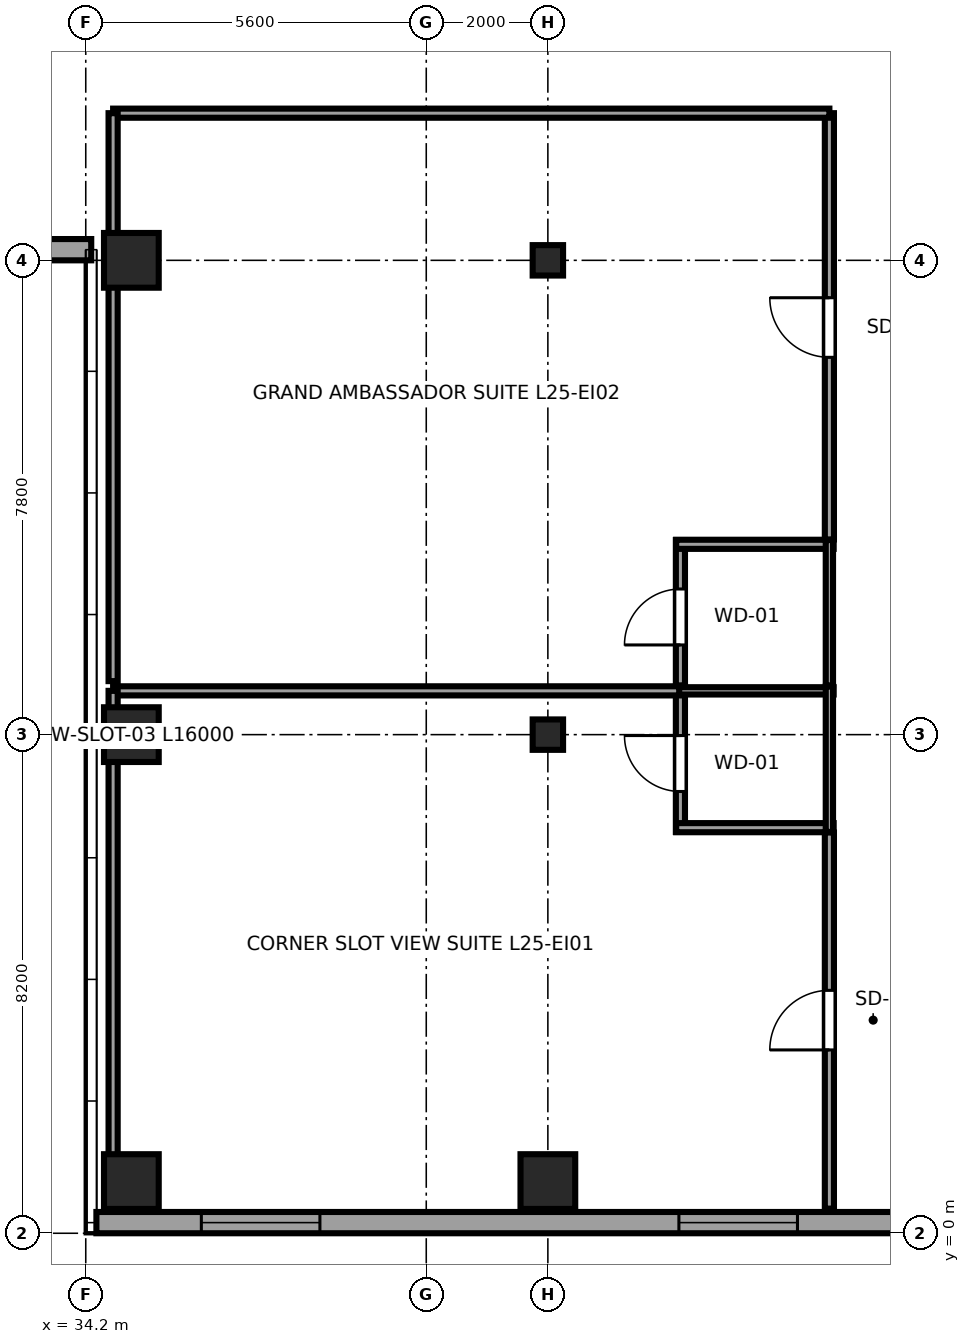
"""IFC4 building model, lengths in metres.
Left out: names, types, materials, properties, quantities, classifications, styles, units other than length and angle.
Written with IfcOpenShell. Run it as: python <this file> out.ifc"""

import sys

from ifc_helpers import new_model, si_unit, direction, frame, frame_2d, origin, origin_2d, place, context, subcontext, project, spatial, rectangle, i_section, extrude, source, transform, mapped, element, fill, save


model = new_model("IFC4")
c1 = context("Model", 3, precision=1e-05, world=origin(), true_north=direction((0.0, 1.0)))
c2 = subcontext(c1, "Body", "Model", "MODEL_VIEW")
j1 = project(units=[si_unit("LENGTHUNIT", "METRE"), si_unit("PLANEANGLEUNIT", "RADIAN")], contexts=[c1])
p1 = place(None, origin())
s1 = spatial("IfcSite", under=j1, at=p1, CompositionType="ELEMENT")
p2 = place(p1, origin())
s2 = spatial("IfcBuilding", under=s1, at=p2, CompositionType="ELEMENT")
p3 = place(p2, frame((0.0, 0.0, 100.9)))
s3 = spatial("IfcBuildingStorey", under=s2, at=p3, CompositionType="ELEMENT", Elevation=100.9)
m1 = source(origin(), c2, "Body", "SweptSolid", [
    extrude(rectangle(XDim=0.9, YDim=0.9, at=origin_2d()), origin(), (0.0, 0.0, 1.0), 3.55),
])
for number, where, z_axis, x_axis in (
    (1, (34.95, 0.85, 0.0), (0.0, 0.0, 1.0), (1.0, 0.0, 0.0)),
    (2, (34.95, 8.2, 0.0), (0.0, 0.0, 1.0), (1.0, 0.0, 0.0)),
    (3, (34.95, 16.0, 0.0), (0.0, 0.0, 1.0), (1.0, 0.0, 0.0)),
    (4, (41.8, 0.85, 0.0), (0.0, 0.0, 1.0), (1.0, 0.0, 0.0)),
):
    element("IfcColumn", number, at=place(p3, frame(where, z_axis=z_axis, x_axis=x_axis)), inside=s3, PredefinedType="COLUMN", context=c2, shape_type="MappedRepresentation", body=[
        mapped(m1, transform((0.0, 0.0, 0.0), x_axis=(1.0, 0.0, 0.0), y_axis=(0.0, 1.0, 0.0), z_axis=(0.0, 0.0, 1.0), scale=1.0)),
    ])
m2 = source(origin(), c2, "Body", "SweptSolid", [
    extrude(i_section(OverallWidth=0.5, OverallDepth=0.5, WebThickness=0.022, FlangeThickness=0.034, at=origin_2d()), origin(), (0.0, 0.0, 1.0), 3.55),
])
for number, where, z_axis, x_axis in (
    (5, (41.8, 8.2, 0.0), (0.0, 0.0, 1.0), (1.0, 0.0, 0.0)),
    (6, (41.8, 16.0, 0.0), (0.0, 0.0, 1.0), (1.0, 0.0, 0.0)),
):
    element("IfcColumn", number, at=place(p3, frame(where, z_axis=z_axis, x_axis=x_axis)), inside=s3, PredefinedType="COLUMN", context=c2, shape_type="MappedRepresentation", body=[
        mapped(m2, transform((0.0, 0.0, 0.0), x_axis=(1.0, 0.0, 0.0), y_axis=(0.0, 1.0, 0.0), z_axis=(0.0, 0.0, 1.0), scale=1.0)),
    ])
p4 = place(p3, frame((22.71, 16.175, 0.0), z_axis=(0.0, 0.0, 1.0), x_axis=(1.0, 0.0, 0.0)))
e7 = element("IfcWall", 7, at=p4, inside=s3, PredefinedType="SOLIDWALL", context=c2, shape_type="SweptSolid", body=[
    extrude(rectangle(XDim=11.58, YDim=0.35, at=frame_2d((5.79, 0.0))), origin(), (0.0, 0.0, 1.0), 2.748),
])
p5 = place(p4, frame((2.22, 0.0, 0.68)))
e8 = element("IfcOpeningElement", 8, at=p5, cuts=e7, PredefinedType="OPENING", context=c2, shape_type="SweptSolid", body=[
    extrude(rectangle(XDim=1.95, YDim=1.82, at=frame_2d((0.975, 0.91))), frame((0.0, 0.185, 0.0), z_axis=(0.0, -1.0, 0.0), x_axis=(1.0, 0.0, 0.0)), (0.0, 0.0, 1.0), 0.37),
])
p6 = place(p4, frame((7.41, 0.0, 0.68)))
e9 = element("IfcOpeningElement", 9, at=p6, cuts=e7, PredefinedType="OPENING", context=c2, shape_type="SweptSolid", body=[
    extrude(rectangle(XDim=1.95, YDim=1.82, at=frame_2d((0.975, 0.91))), frame((0.0, 0.185, 0.0), z_axis=(0.0, -1.0, 0.0), x_axis=(1.0, 0.0, 0.0)), (0.0, 0.0, 1.0), 0.37),
])
p7 = place(p3, frame((34.375, 0.175, 0.0), z_axis=(0.0, 0.0, 1.0), x_axis=(1.0, 0.0, 0.0)))
e10 = element("IfcWall", 10, at=p7, inside=s3, PredefinedType="SOLIDWALL", context=c2, shape_type="SweptSolid", body=[
    extrude(rectangle(XDim=18.008, YDim=0.35, at=frame_2d((9.004, 0.0))), origin(), (0.0, 0.0, 1.0), 3.37),
])
p8 = place(p7, frame((1.726, 0.0, 0.68)))
e11 = element("IfcOpeningElement", 11, at=p8, cuts=e10, PredefinedType="OPENING", context=c2, shape_type="SweptSolid", body=[
    extrude(rectangle(XDim=1.95, YDim=1.82, at=frame_2d((0.975, 0.91))), frame((0.0, 0.185, 0.0), z_axis=(0.0, -1.0, 0.0), x_axis=(1.0, 0.0, 0.0)), (0.0, 0.0, 1.0), 0.37),
])
p9 = place(p7, frame((9.58, 0.0, 0.68)))
e12 = element("IfcOpeningElement", 12, at=p9, cuts=e10, PredefinedType="OPENING", context=c2, shape_type="SweptSolid", body=[
    extrude(rectangle(XDim=1.95, YDim=1.82, at=frame_2d((0.975, 0.91))), frame((0.0, 0.185, 0.0), z_axis=(0.0, -1.0, 0.0), x_axis=(1.0, 0.0, 0.0)), (0.0, 0.0, 1.0), 0.37),
])
p10 = place(p7, frame((15.241, 0.0, 0.62)))
e13 = element("IfcOpeningElement", 13, at=p10, cuts=e10, PredefinedType="OPENING", context=c2, shape_type="SweptSolid", body=[
    extrude(rectangle(XDim=1.5, YDim=1.55, at=frame_2d((0.75, 0.775))), frame((0.0, 0.185, 0.0), z_axis=(0.0, -1.0, 0.0), x_axis=(1.0, 0.0, 0.0)), (0.0, 0.0, 1.0), 0.37),
])
p11 = place(p3, frame((43.98, 6.6, 0.0), z_axis=(0.0, 0.0, 1.0), x_axis=(0.0, 1.0, 0.0)))
e14 = element("IfcWall", 14, at=p11, inside=s3, PredefinedType="PARTITIONING", context=c2, shape_type="SweptSolid", body=[
    extrude(rectangle(XDim=2.39, YDim=0.15, at=frame_2d((1.195, 0.0))), origin(), (0.0, 0.0, 1.0), 3.37),
])
p12 = place(p11, frame((0.665, 0.0, 0.0)))
e15 = element("IfcOpeningElement", 15, at=p12, cuts=e14, PredefinedType="OPENING", context=c2, shape_type="SweptSolid", body=[
    extrude(rectangle(XDim=0.92, YDim=2.01, at=frame_2d((0.46, 1.005))), frame((0.0, 0.085, 0.0), z_axis=(0.0, -1.0, 0.0), x_axis=(1.0, 0.0, 0.0)), (0.0, 0.0, 1.0), 0.17),
])
p13 = place(p3, frame((43.91, 6.67, 0.0), z_axis=(0.0, 0.0, 1.0), x_axis=(1.0, 0.0, 0.0)))
e16 = element("IfcWall", 16, at=p13, inside=s3, PredefinedType="PARTITIONING", context=c2, shape_type="SweptSolid", body=[
    extrude(rectangle(XDim=2.59, YDim=0.15, at=frame_2d((1.295, 0.0))), origin(), (0.0, 0.0, 1.0), 3.37),
])
p14 = place(p3, frame((43.91, 8.92, 0.0), z_axis=(0.0, 0.0, 1.0), x_axis=(1.0, 0.0, 0.0)))
e17 = element("IfcWall", 17, at=p14, inside=s3, PredefinedType="PLUMBINGWALL", context=c2, shape_type="SweptSolid", body=[
    extrude(rectangle(XDim=2.59, YDim=0.12, at=frame_2d((1.295, 0.0))), origin(), (0.0, 0.0, 1.0), 3.37),
])
p15 = place(p3, frame((46.43, 6.6, 0.0), z_axis=(0.0, 0.0, 1.0), x_axis=(0.0, 1.0, 0.0)))
e18 = element("IfcWall", 18, at=p15, inside=s3, PredefinedType="PLUMBINGWALL", context=c2, shape_type="SweptSolid", body=[
    extrude(rectangle(XDim=2.39, YDim=0.12, at=frame_2d((1.195, 0.0))), origin(), (0.0, 0.0, 1.0), 3.37),
])
p16 = place(p3, frame((43.98, 9.01, 0.0), z_axis=(0.0, 0.0, 1.0), x_axis=(0.0, 1.0, 0.0)))
e19 = element("IfcWall", 19, at=p16, inside=s3, PredefinedType="PARTITIONING", context=c2, shape_type="SweptSolid", body=[
    extrude(rectangle(XDim=2.39, YDim=0.15, at=frame_2d((1.195, 0.0))), origin(), (0.0, 0.0, 1.0), 3.37),
])
p17 = place(p16, frame((0.665, 0.0, 0.0)))
e20 = element("IfcOpeningElement", 20, at=p17, cuts=e19, PredefinedType="OPENING", context=c2, shape_type="SweptSolid", body=[
    extrude(rectangle(XDim=0.92, YDim=2.01, at=frame_2d((0.46, 1.005))), frame((0.0, 0.085, 0.0), z_axis=(0.0, -1.0, 0.0), x_axis=(1.0, 0.0, 0.0)), (0.0, 0.0, 1.0), 0.17),
])
p18 = place(p3, frame((43.91, 11.33, 0.0), z_axis=(0.0, 0.0, 1.0), x_axis=(1.0, 0.0, 0.0)))
e21 = element("IfcWall", 21, at=p18, inside=s3, PredefinedType="PARTITIONING", context=c2, shape_type="SweptSolid", body=[
    extrude(rectangle(XDim=2.59, YDim=0.15, at=frame_2d((1.295, 0.0))), origin(), (0.0, 0.0, 1.0), 3.37),
])
p19 = place(p3, frame((46.43, 9.01, 0.0), z_axis=(0.0, 0.0, 1.0), x_axis=(0.0, 1.0, 0.0)))
e22 = element("IfcWall", 22, at=p19, inside=s3, PredefinedType="PLUMBINGWALL", context=c2, shape_type="SweptSolid", body=[
    extrude(rectangle(XDim=2.39, YDim=0.12, at=frame_2d((1.195, 0.0))), origin(), (0.0, 0.0, 1.0), 3.37),
])
p20 = place(p3, frame((46.43, 0.405, 0.0), z_axis=(0.0, 0.0, 1.0), x_axis=(0.0, 1.0, 0.0)))
e23 = element("IfcWall", 23, at=p20, inside=s3, PredefinedType="PARTITIONING", context=c2, shape_type="SweptSolid", body=[
    extrude(rectangle(XDim=6.185, YDim=0.15, at=frame_2d((3.093, 0.0))), origin(), (0.0, 0.0, 1.0), 3.37),
])
p21 = place(p20, frame((2.61, 0.0, 0.0)))
e24 = element("IfcOpeningElement", 24, at=p21, cuts=e23, PredefinedType="OPENING", context=c2, shape_type="SweptSolid", body=[
    extrude(rectangle(XDim=0.98, YDim=2.12, at=frame_2d((0.49, 1.06))), frame((0.0, 0.085, 0.0), z_axis=(0.0, -1.0, 0.0), x_axis=(1.0, 0.0, 0.0)), (0.0, 0.0, 1.0), 0.17),
])
p22 = place(p3, frame((34.65, 8.92, 0.0), z_axis=(0.0, 0.0, 1.0), x_axis=(1.0, 0.0, 0.0)))
e25 = element("IfcWall", 25, at=p22, inside=s3, PredefinedType="PARTITIONING", context=c2, shape_type="SweptSolid", body=[
    extrude(rectangle(XDim=9.31, YDim=0.15, at=frame_2d((4.655, 0.0))), origin(), (0.0, 0.0, 1.0), 3.37),
])
p23 = place(p3, frame((34.65, 0.405, 0.0), z_axis=(0.0, 0.0, 1.0), x_axis=(0.0, 1.0, 0.0)))
e26 = element("IfcWall", 26, at=p23, inside=s3, PredefinedType="PARTITIONING", context=c2, shape_type="SweptSolid", body=[
    extrude(rectangle(XDim=8.515, YDim=0.15, at=frame_2d((4.257, 0.0))), origin(), (0.0, 0.0, 1.0), 3.37),
])
p24 = place(p3, frame((46.43, 11.41, 0.0), z_axis=(0.0, 0.0, 1.0), x_axis=(0.0, 1.0, 0.0)))
e27 = element("IfcWall", 27, at=p24, inside=s3, PredefinedType="PARTITIONING", context=c2, shape_type="SweptSolid", body=[
    extrude(rectangle(XDim=7.01, YDim=0.15, at=frame_2d((3.505, 0.0))), origin(), (0.0, 0.0, 1.0), 3.37),
])
p25 = place(p24, frame((2.995, 0.0, 0.0)))
e28 = element("IfcOpeningElement", 28, at=p25, cuts=e27, PredefinedType="OPENING", context=c2, shape_type="SweptSolid", body=[
    extrude(rectangle(XDim=0.98, YDim=2.12, at=frame_2d((0.49, 1.06))), frame((0.0, 0.085, 0.0), z_axis=(0.0, -1.0, 0.0), x_axis=(1.0, 0.0, 0.0)), (0.0, 0.0, 1.0), 0.17),
])
p26 = place(p3, frame((34.65, 18.42, 0.0), z_axis=(0.0, 0.0, 1.0), x_axis=(1.0, 0.0, 0.0)))
e29 = element("IfcWall", 29, at=p26, inside=s3, PredefinedType="PARTITIONING", context=c2, shape_type="SweptSolid", body=[
    extrude(rectangle(XDim=11.78, YDim=0.15, at=frame_2d((5.89, 0.0))), origin(), (0.0, 0.0, 1.0), 3.37),
])
p27 = place(p3, frame((34.65, 9.08, 0.0), z_axis=(0.0, 0.0, 1.0), x_axis=(0.0, 1.0, 0.0)))
e30 = element("IfcWall", 30, at=p27, inside=s3, PredefinedType="PARTITIONING", context=c2, shape_type="SweptSolid", body=[
    extrude(rectangle(XDim=9.34, YDim=0.15, at=frame_2d((4.67, 0.0))), origin(), (0.0, 0.0, 1.0), 3.37),
])
m3 = source(origin(), c2, "Body", "SweptSolid", [
    extrude(rectangle(XDim=1.95, YDim=1.82, at=frame_2d((0.975, 0.91))), frame((0.0, 0.09, 0.0), z_axis=(0.0, -1.0, 0.0), x_axis=(1.0, 0.0, 0.0)), (0.0, 0.0, 1.0), 0.06),
])
p28 = place(p8, origin())
e31 = element("IfcWindow", 31, at=p28, inside=s3, PartitioningType="DOUBLE_PANEL_VERTICAL", PredefinedType="WINDOW", context=c2, shape_type="MappedRepresentation", body=[
    mapped(m3, transform((0.0, 0.0, 0.0), x_axis=(1.0, 0.0, 0.0), y_axis=(0.0, 1.0, 0.0), z_axis=(0.0, 0.0, 1.0), scale=1.0)),
])
fill(e11, e31)
p29 = place(p9, origin())
e32 = element("IfcWindow", 32, at=p29, inside=s3, PartitioningType="DOUBLE_PANEL_VERTICAL", PredefinedType="WINDOW", context=c2, shape_type="MappedRepresentation", body=[
    mapped(m3, transform((0.0, 0.0, 0.0), x_axis=(1.0, 0.0, 0.0), y_axis=(0.0, 1.0, 0.0), z_axis=(0.0, 0.0, 1.0), scale=1.0)),
])
fill(e12, e32)
m4 = source(origin(), c2, "Body", "SweptSolid", [
    extrude(rectangle(XDim=0.92, YDim=2.01, at=frame_2d((0.46, 1.005))), frame((0.0, 0.025, 0.0), z_axis=(0.0, -1.0, 0.0), x_axis=(1.0, 0.0, 0.0)), (0.0, 0.0, 1.0), 0.05),
])
p30 = place(p12, origin())
e33 = element("IfcDoor", 33, at=p30, inside=s3, OperationType="SINGLE_SWING_RIGHT", PredefinedType="DOOR", context=c2, shape_type="MappedRepresentation", body=[
    mapped(m4, transform((0.0, 0.0, 0.0), x_axis=(1.0, 0.0, 0.0), y_axis=(0.0, 1.0, 0.0), z_axis=(0.0, 0.0, 1.0), scale=1.0)),
])
fill(e15, e33)
p31 = place(p17, origin())
e34 = element("IfcDoor", 34, at=p31, inside=s3, OperationType="SINGLE_SWING_LEFT", PredefinedType="DOOR", context=c2, shape_type="MappedRepresentation", body=[
    mapped(m4, transform((0.0, 0.0, 0.0), x_axis=(1.0, 0.0, 0.0), y_axis=(0.0, 1.0, 0.0), z_axis=(0.0, 0.0, 1.0), scale=1.0)),
])
fill(e20, e34)
m5 = source(origin(), c2, "Body", "SweptSolid", [
    extrude(rectangle(XDim=0.98, YDim=2.12, at=frame_2d((0.49, 1.06))), frame((0.0, 0.025, 0.0), z_axis=(0.0, -1.0, 0.0), x_axis=(1.0, 0.0, 0.0)), (0.0, 0.0, 1.0), 0.05),
])
p32 = place(p21, origin())
e35 = element("IfcDoor", 35, at=p32, inside=s3, OperationType="SINGLE_SWING_LEFT", PredefinedType="DOOR", context=c2, shape_type="MappedRepresentation", body=[
    mapped(m5, transform((0.0, 0.0, 0.0), x_axis=(1.0, 0.0, 0.0), y_axis=(0.0, 1.0, 0.0), z_axis=(0.0, 0.0, 1.0), scale=1.0)),
])
fill(e24, e35)
p33 = place(p25, origin())
e36 = element("IfcDoor", 36, at=p33, inside=s3, OperationType="SINGLE_SWING_RIGHT", PredefinedType="DOOR", context=c2, shape_type="MappedRepresentation", body=[
    mapped(m5, transform((0.0, 0.0, 0.0), x_axis=(1.0, 0.0, 0.0), y_axis=(0.0, 1.0, 0.0), z_axis=(0.0, 0.0, 1.0), scale=1.0)),
])
fill(e28, e36)
save(model, sys.argv[1])
